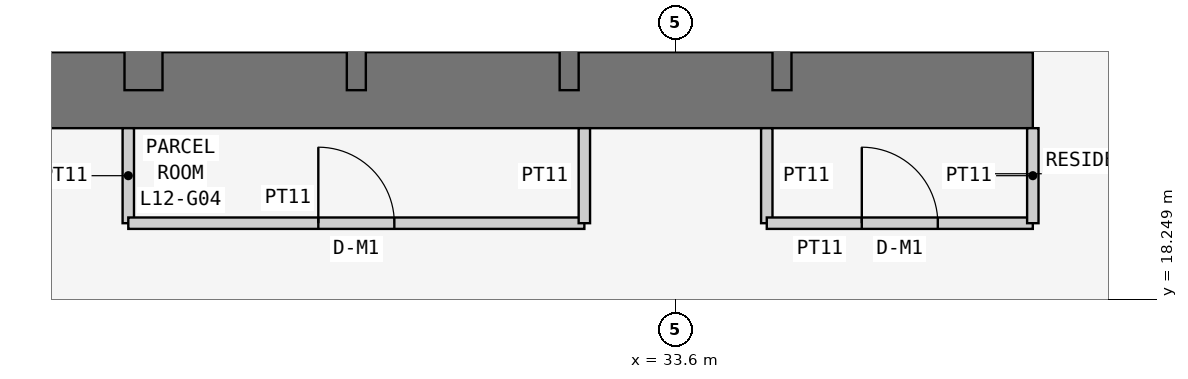
"""IFC4 building model, lengths in metres.
Left out: names, types, materials, properties, quantities, classifications, styles, units other than length and angle.
Written with IfcOpenShell. Run it as: python <this file> out.ifc"""

import sys

from ifc_helpers import new_model, si_unit, direction, frame, frame_2d, origin, place, context, subcontext, project, spatial, rectangle, extrude, element, fill, save


model = new_model("IFC4")
c1 = context("Model", 3, precision=1e-05, world=origin(), true_north=direction((0.0, 1.0)))
c2 = subcontext(c1, "Body", "Model", "MODEL_VIEW")
j1 = project(units=[si_unit("LENGTHUNIT", "METRE"), si_unit("PLANEANGLEUNIT", "RADIAN")], contexts=[c1])
p1 = place(None, origin())
s1 = spatial("IfcSite", under=j1, at=p1, CompositionType="ELEMENT")
p2 = place(p1, origin())
s2 = spatial("IfcBuilding", under=s1, at=p2, CompositionType="ELEMENT")
p3 = place(p2, frame((0.0, 0.0, 52.5)))
s3 = spatial("IfcBuildingStorey", under=s2, at=p3, CompositionType="ELEMENT", Elevation=52.5)
p4 = place(p3, frame((21.0, 21.0, 0.0), z_axis=(0.0, 0.0, 1.0), x_axis=(1.0, 0.0, 0.0)))
e1 = element("IfcWall", 1, at=p4, inside=s3, PredefinedType="SHEAR", context=c2, shape_type="SweptSolid", body=[
    extrude(rectangle(XDim=17.3, YDim=1.0, at=frame_2d((8.65, 0.0))), origin(), (0.0, 0.0, 1.0), 3.6),
])
p5 = place(p3, frame((37.8, 21.0, 0.0), z_axis=(0.0, 0.0, 1.0), x_axis=(0.0, 1.0, 0.0)))
e2 = element("IfcWall", 2, at=p5, inside=s3, PredefinedType="SHEAR", context=c2, shape_type="SweptSolid", body=[
    extrude(rectangle(XDim=17.3, YDim=1.0, at=frame_2d((8.65, 0.0))), origin(), (0.0, 0.0, 1.0), 3.6),
])
p6 = place(p5, frame((5.2, 0.0, 0.0)))
e3 = element("IfcOpeningElement", 3, at=p6, cuts=e2, PredefinedType="OPENING", context=c2, shape_type="SweptSolid", body=[
    extrude(rectangle(XDim=1.2, YDim=2.1, at=frame_2d((0.6, 1.05))), frame((0.0, 0.51, 0.0), z_axis=(0.0, -1.0, 0.0), x_axis=(1.0, 0.0, 0.0)), (0.0, 0.0, 1.0), 1.02),
])
p7 = place(p3, frame((26.6, 21.0, 0.0), z_axis=(0.0, 0.0, 1.0), x_axis=(0.0, 1.0, 0.0)))
e4 = element("IfcWall", 4, at=p7, inside=s3, PredefinedType="SHEAR", context=c2, shape_type="SweptSolid", body=[
    extrude(rectangle(XDim=16.8, YDim=0.5, at=frame_2d((8.4, 0.0))), origin(), (0.0, 0.0, 1.0), 3.6),
])
p8 = place(p7, frame((10.4, 0.0, 0.0)))
e5 = element("IfcOpeningElement", 5, at=p8, cuts=e4, PredefinedType="OPENING", context=c2, shape_type="SweptSolid", body=[
    extrude(rectangle(XDim=1.2, YDim=2.1, at=frame_2d((0.6, 1.05))), frame((0.0, 0.26, 0.0), z_axis=(0.0, -1.0, 0.0), x_axis=(1.0, 0.0, 0.0)), (0.0, 0.0, 1.0), 0.52),
])
for number, where, z_axis, x_axis in (
    (6, (29.4, 21.0, 0.0), (0.0, 0.0, 1.0), (0.0, 1.0, 0.0)),
    (7, (32.2, 21.0, 0.0), (0.0, 0.0, 1.0), (0.0, 1.0, 0.0)),
    (8, (35.0, 21.0, 0.0), (0.0, 0.0, 1.0), (0.0, 1.0, 0.0)),
):
    element("IfcWall", number, at=place(p3, frame(where, z_axis=z_axis, x_axis=x_axis)), inside=s3, PredefinedType="SHEAR", context=c2, shape_type="SweptSolid", body=[
        extrude(rectangle(XDim=3.2, YDim=0.25, at=frame_2d((1.6, 0.0))), origin(), (0.0, 0.0, 1.0), 3.6),
    ])
p9 = place(p3, frame((26.4, 20.5, 0.0), z_axis=(0.0, 0.0, 1.0), x_axis=(0.0, -1.0, 0.0)))
e9 = element("IfcWall", 9, at=p9, inside=s3, PredefinedType="PARTITIONING", context=c2, shape_type="SweptSolid", body=[
    extrude(rectangle(XDim=1.25, YDim=0.15, at=frame_2d((0.625, 0.0))), origin(), (0.0, 0.0, 1.0), 3.45),
])
p10 = place(p3, frame((26.4, 19.25, 0.0), z_axis=(0.0, 0.0, 1.0), x_axis=(1.0, 0.0, 0.0)))
e10 = element("IfcWall", 10, at=p10, inside=s3, PredefinedType="PARTITIONING", context=c2, shape_type="SweptSolid", body=[
    extrude(rectangle(XDim=6.0, YDim=0.15, at=frame_2d((3.0, 0.0))), origin(), (0.0, 0.0, 1.0), 3.45),
])
p11 = place(p10, frame((2.5, 0.0, 0.0)))
e11 = element("IfcOpeningElement", 11, at=p11, cuts=e10, PredefinedType="OPENING", context=c2, shape_type="SweptSolid", body=[
    extrude(rectangle(XDim=1.0, YDim=2.1, at=frame_2d((0.5, 1.05))), frame((0.0, 0.085, 0.0), z_axis=(0.0, -1.0, 0.0), x_axis=(1.0, 0.0, 0.0)), (0.0, 0.0, 1.0), 0.17),
])
for number, where, z_axis, x_axis in (
    (12, (32.4, 19.25, 0.0), (0.0, 0.0, 1.0), (0.0, 1.0, 0.0)),
    (13, (34.8, 20.5, 0.0), (0.0, 0.0, 1.0), (0.0, -1.0, 0.0)),
):
    element("IfcWall", number, at=place(p3, frame(where, z_axis=z_axis, x_axis=x_axis)), inside=s3, PredefinedType="PARTITIONING", context=c2, shape_type="SweptSolid", body=[
        extrude(rectangle(XDim=1.25, YDim=0.15, at=frame_2d((0.625, 0.0))), origin(), (0.0, 0.0, 1.0), 3.45),
    ])
p12 = place(p3, frame((34.8, 19.25, 0.0), z_axis=(0.0, 0.0, 1.0), x_axis=(1.0, 0.0, 0.0)))
e14 = element("IfcWall", 14, at=p12, inside=s3, PredefinedType="PARTITIONING", context=c2, shape_type="SweptSolid", body=[
    extrude(rectangle(XDim=3.5, YDim=0.15, at=frame_2d((1.75, 0.0))), origin(), (0.0, 0.0, 1.0), 3.45),
])
p13 = place(p12, frame((1.25, 0.0, 0.0)))
e15 = element("IfcOpeningElement", 15, at=p13, cuts=e14, PredefinedType="OPENING", context=c2, shape_type="SweptSolid", body=[
    extrude(rectangle(XDim=1.0, YDim=2.1, at=frame_2d((0.5, 1.05))), frame((0.0, 0.085, 0.0), z_axis=(0.0, -1.0, 0.0), x_axis=(1.0, 0.0, 0.0)), (0.0, 0.0, 1.0), 0.17),
])
p14 = place(p3, frame((38.3, 19.25, 0.0), z_axis=(0.0, 0.0, 1.0), x_axis=(0.0, 1.0, 0.0)))
e16 = element("IfcWall", 16, at=p14, inside=s3, PredefinedType="PARTITIONING", context=c2, shape_type="SweptSolid", body=[
    extrude(rectangle(XDim=1.25, YDim=0.15, at=frame_2d((0.625, 0.0))), origin(), (0.0, 0.0, 1.0), 3.45),
])
p15 = place(p11, origin())
e17 = element("IfcDoor", 17, at=p15, inside=s3, OperationType="SINGLE_SWING_LEFT", PredefinedType="DOOR", context=c2, shape_type="SweptSolid", body=[
    extrude(rectangle(XDim=1.0, YDim=2.1, at=frame_2d((0.5, 1.05))), frame((0.0, 0.025, 0.0), z_axis=(0.0, -1.0, 0.0), x_axis=(1.0, 0.0, 0.0)), (0.0, 0.0, 1.0), 0.05),
])
fill(e11, e17)
p16 = place(p13, origin())
e18 = element("IfcDoor", 18, at=p16, inside=s3, OperationType="SINGLE_SWING_LEFT", PredefinedType="DOOR", context=c2, shape_type="SweptSolid", body=[
    extrude(rectangle(XDim=1.0, YDim=2.1, at=frame_2d((0.5, 1.05))), frame((0.0, 0.025, 0.0), z_axis=(0.0, -1.0, 0.0), x_axis=(1.0, 0.0, 0.0)), (0.0, 0.0, 1.0), 0.05),
])
fill(e15, e18)
save(model, sys.argv[1])
